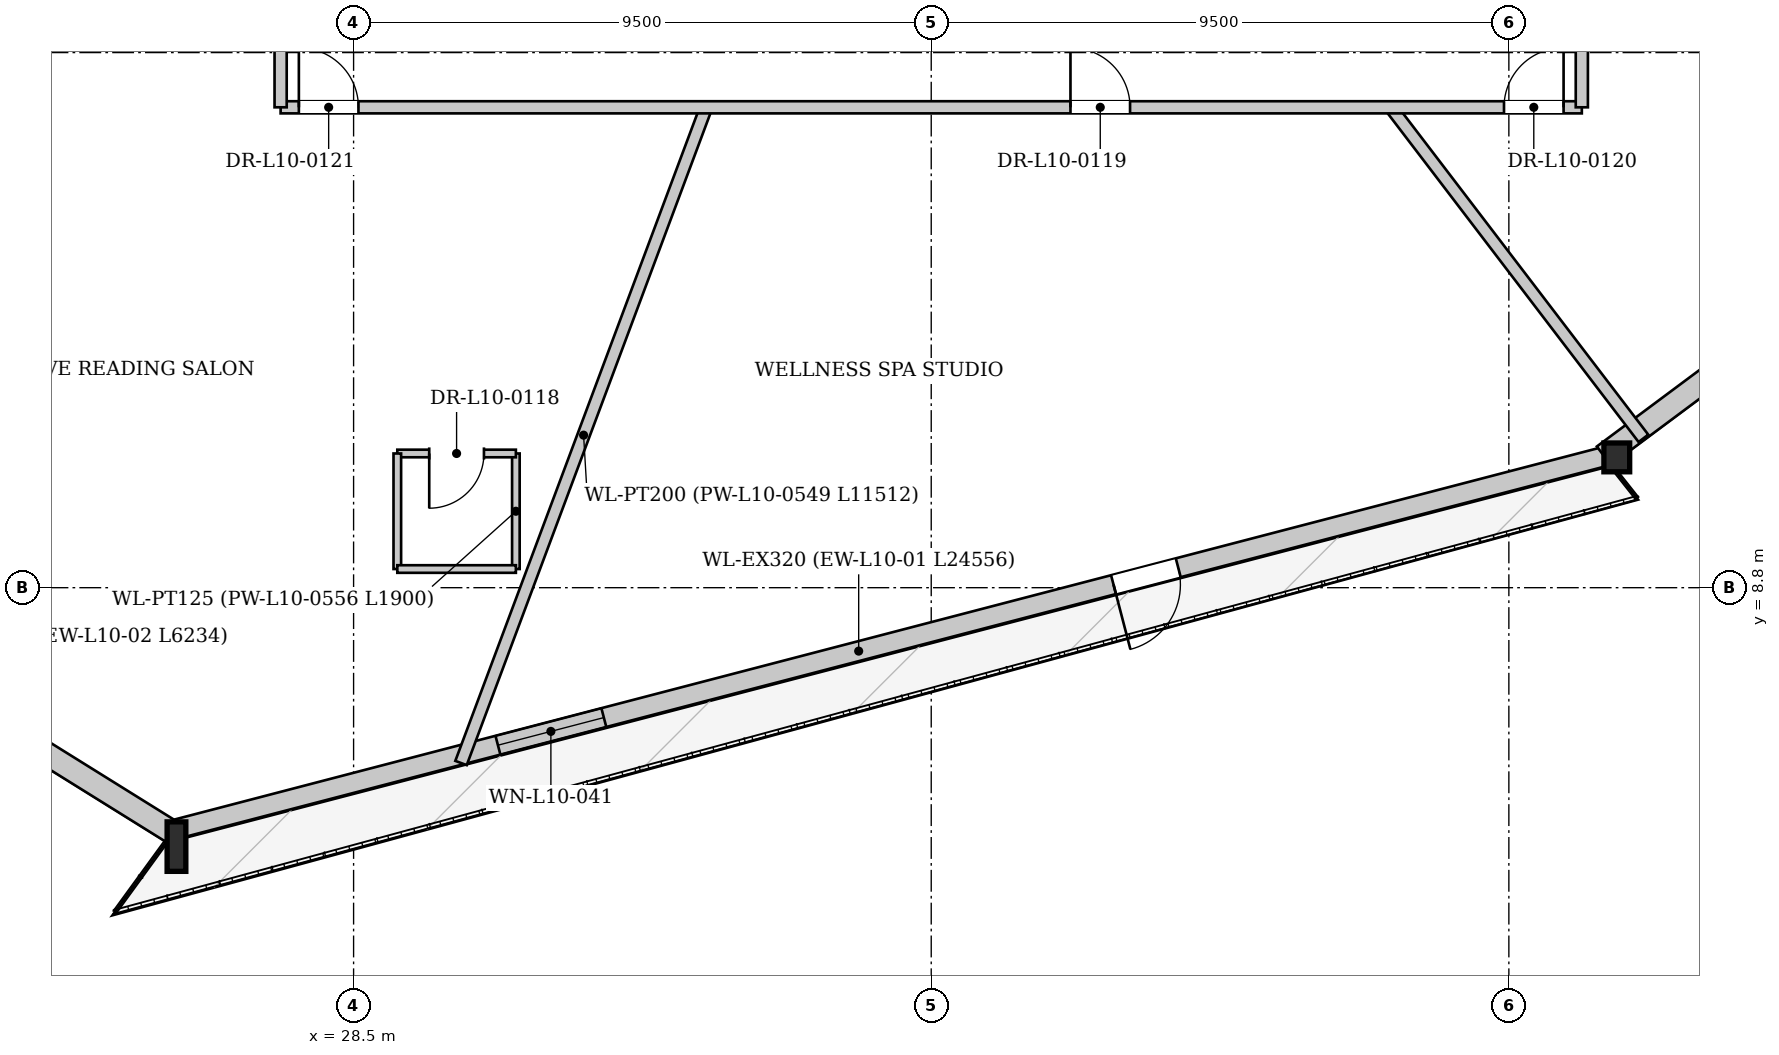
"""IFC4 building model, lengths in metres.
Left out: names, types, materials, properties, quantities, classifications, styles, units other than length and angle.
Written with IfcOpenShell. Run it as: python <this file> out.ifc"""

import sys

from ifc_helpers import new_model, si_unit, direction, frame, frame_2d, origin, origin_2d, place, context, subcontext, project, spatial, rectangle, i_section, extrude, source, transform, mapped, element, fill, save


model = new_model("IFC4")
c1 = context("Model", 3, precision=1e-05, world=origin(), true_north=direction((0.0, 1.0)))
c2 = subcontext(c1, "Body", "Model", "MODEL_VIEW")
j1 = project(units=[si_unit("LENGTHUNIT", "METRE"), si_unit("PLANEANGLEUNIT", "RADIAN")], contexts=[c1])
p1 = place(None, origin())
s1 = spatial("IfcSite", under=j1, at=p1, CompositionType="ELEMENT")
p2 = place(p1, origin())
s2 = spatial("IfcBuilding", under=s1, at=p2, CompositionType="ELEMENT")
p3 = place(p2, frame((0.0, 0.0, 43.5)))
s3 = spatial("IfcBuildingStorey", under=s2, at=p3, CompositionType="ELEMENT", Elevation=43.5)
m1 = source(origin(), c2, "Body", "SweptSolid", [
    extrude(i_section(OverallWidth=0.308, OverallDepth=0.814, WebThickness=0.021, FlangeThickness=0.04, at=origin_2d()), origin(), (0.0, 0.0, 1.0), 3.406),
])
p4 = place(p3, frame((25.414, 4.62, 0.0), z_axis=(0.101705377608, -0.045799673215, 0.993759732581), x_axis=(0.410605127545, 0.911813264454, 0.0)))
e1 = element("IfcColumn", 1, at=p4, inside=s3, PredefinedType="COLUMN", context=c2, shape_type="MappedRepresentation", body=[
    mapped(m1, transform((0.0, 0.0, 0.0), x_axis=(1.0, 0.0, 0.0), y_axis=(0.0, 1.0, 0.0), z_axis=(0.0, 0.0, 1.0), scale=1.0)),
])
m2 = source(origin(), c2, "Body", "SweptSolid", [
    extrude(i_section(OverallWidth=0.424, OverallDepth=0.474, WebThickness=0.043, FlangeThickness=0.068, at=origin_2d()), origin(), (0.0, 0.0, 1.0), 3.4),
])
p5 = place(p3, frame((49.174, 10.817, 0.0), z_axis=(0.059235895366, 0.07366791351, 0.995522047581), x_axis=(-0.779310211571, 0.626638328018, 0.0)))
e2 = element("IfcColumn", 2, at=p5, inside=s3, PredefinedType="COLUMN", context=c2, shape_type="MappedRepresentation", body=[
    mapped(m2, transform((0.0, 0.0, 0.0), x_axis=(1.0, 0.0, 0.0), y_axis=(0.0, 1.0, 0.0), z_axis=(0.0, 0.0, 1.0), scale=1.0)),
])
p6 = place(p3, frame((49.134, 10.972, 0.0), z_axis=(0.0, 0.0, 1.0), x_axis=(-0.967626668542, -0.252385875847, 0.0)))
e3 = element("IfcWall", 3, at=p6, inside=s3, PredefinedType="SOLIDWALL", context=c2, shape_type="SweptSolid", body=[
    extrude(rectangle(XDim=24.556, YDim=0.32, at=frame_2d((12.278, 0.0))), origin(), (0.0, 0.0, 1.0), 2.592),
])
p7 = place(p6, frame((7.308, 0.0, 0.0)))
e4 = element("IfcOpeningElement", 4, at=p7, cuts=e3, PredefinedType="OPENING", context=c2, shape_type="SweptSolid", body=[
    extrude(rectangle(XDim=1.1, YDim=2.3, at=frame_2d((0.55, 1.15))), frame((0.0, 0.17, 0.0), z_axis=(0.0, -1.0, 0.0), x_axis=(1.0, 0.0, 0.0)), (0.0, 0.0, 1.0), 0.34),
])
p8 = place(p6, frame((17.071, 0.0, 0.272)))
e5 = element("IfcOpeningElement", 5, at=p8, cuts=e3, PredefinedType="OPENING", context=c2, shape_type="SweptSolid", body=[
    extrude(rectangle(XDim=1.8, YDim=2.2, at=frame_2d((0.9, 1.1))), frame((0.0, 0.17, 0.0), z_axis=(0.0, -1.0, 0.0), x_axis=(1.0, 0.0, 0.0)), (0.0, 0.0, 1.0), 0.34),
])
p9 = place(p3, frame((25.514, 4.781, 0.0), z_axis=(0.0, 0.0, 1.0), x_axis=(-0.848982430353, 0.528421075424, 0.0)))
e6 = element("IfcWall", 6, at=p9, inside=s3, PredefinedType="SOLIDWALL", context=c2, shape_type="SweptSolid", body=[
    extrude(rectangle(XDim=6.234, YDim=0.38, at=frame_2d((3.117, 0.0))), origin(), (0.0, 0.0, 1.0), 2.592),
])
p10 = place(p3, frame((68.754, 25.638, 0.0), z_axis=(0.0, 0.0, 1.0), x_axis=(-0.801982102685, -0.59734806183, 0.0)))
e7 = element("IfcWall", 7, at=p10, inside=s3, PredefinedType="SOLIDWALL", context=c2, shape_type="SweptSolid", body=[
    extrude(rectangle(XDim=24.556, YDim=0.38, at=frame_2d((12.278, 0.0))), origin(), (0.0, 0.0, 1.0), 2.592),
])
p11 = place(p10, frame((6.276, 0.0, 0.65)))
e8 = element("IfcOpeningElement", 8, at=p11, cuts=e7, PredefinedType="OPENING", context=c2, shape_type="SweptSolid", body=[
    extrude(rectangle(XDim=1.2, YDim=1.5, at=frame_2d((0.6, 0.75))), frame((0.0, 0.2, 0.0), z_axis=(0.0, -1.0, 0.0), x_axis=(1.0, 0.0, 0.0)), (0.0, 0.0, 1.0), 0.4),
])
p12 = place(p10, frame((17.08, 0.0, 0.65)))
e9 = element("IfcOpeningElement", 9, at=p12, cuts=e7, PredefinedType="OPENING", context=c2, shape_type="SweptSolid", body=[
    extrude(rectangle(XDim=1.2, YDim=1.5, at=frame_2d((0.6, 0.75))), frame((0.0, 0.2, 0.0), z_axis=(0.0, -1.0, 0.0), x_axis=(1.0, 0.0, 0.0)), (0.0, 0.0, 1.0), 0.4),
])
p13 = place(p3, frame((34.299, 16.7, 0.0), z_axis=(0.0, 0.0, 1.0), x_axis=(-0.350212246301, -0.936670370269, 0.0)))
e10 = element("IfcWall", 10, at=p13, inside=s3, PredefinedType="PARTITIONING", context=c2, shape_type="SweptSolid", body=[
    extrude(rectangle(XDim=11.512, YDim=0.2, at=frame_2d((5.756, 0.0))), origin(), (0.0, 0.0, 1.0), 3.3),
])
p14 = place(p3, frame((45.557, 16.7, 0.0), z_axis=(0.0, 0.0, 1.0), x_axis=(0.606788320392, -0.794863468928, 0.0)))
e11 = element("IfcWall", 11, at=p14, inside=s3, PredefinedType="PARTITIONING", context=c2, shape_type="SweptSolid", body=[
    extrude(rectangle(XDim=6.849, YDim=0.2, at=frame_2d((3.424, 0.0))), origin(), (0.0, 0.0, 1.0), 2.785),
])
p15 = place(p3, frame((27.3, 20.189, 0.0), z_axis=(0.0, 0.0, 1.0), x_axis=(-0.857808451078, -0.51396951394, 0.0)))
e12 = element("IfcWall", 12, at=p15, inside=s3, PredefinedType="PARTITIONING", context=c2, shape_type="SweptSolid", body=[
    extrude(rectangle(XDim=10.509, YDim=0.2, at=frame_2d((5.254, 0.0))), origin(), (0.0, 0.0, 1.0), 3.3),
])
p16 = place(p3, frame((31.169, 9.107, 0.0), z_axis=(0.0, 0.0, 1.0), x_axis=(0.0, 1.0, 0.0)))
e13 = element("IfcWall", 13, at=p16, inside=s3, PredefinedType="PARTITIONING", context=c2, shape_type="SweptSolid", body=[
    extrude(rectangle(XDim=1.9, YDim=0.125, at=frame_2d((0.95, 0.0))), origin(), (0.0, 0.0, 1.0), 3.3),
])
p17 = place(p3, frame((31.169, 11.007, 0.0), z_axis=(0.0, 0.0, 1.0), x_axis=(-1.0, 0.0, 0.0)))
e14 = element("IfcWall", 14, at=p17, inside=s3, PredefinedType="PARTITIONING", context=c2, shape_type="SweptSolid", body=[
    extrude(rectangle(XDim=1.95, YDim=0.125, at=frame_2d((0.975, 0.0))), origin(), (0.0, 0.0, 1.0), 3.3),
])
p18 = place(p17, frame((0.525, 0.0, 0.0)))
e15 = element("IfcOpeningElement", 15, at=p18, cuts=e14, PredefinedType="OPENING", context=c2, shape_type="SweptSolid", body=[
    extrude(rectangle(XDim=0.9, YDim=2.1, at=frame_2d((0.45, 1.05))), frame((0.0, 0.073, 0.0), z_axis=(0.0, -1.0, 0.0), x_axis=(1.0, 0.0, 0.0)), (0.0, 0.0, 1.0), 0.145),
])
p19 = place(p3, frame((29.219, 11.007, 0.0), z_axis=(0.0, 0.0, 1.0), x_axis=(0.0, -1.0, 0.0)))
e16 = element("IfcWall", 16, at=p19, inside=s3, PredefinedType="PARTITIONING", context=c2, shape_type="SweptSolid", body=[
    extrude(rectangle(XDim=1.9, YDim=0.125, at=frame_2d((0.95, 0.0))), origin(), (0.0, 0.0, 1.0), 2.795),
])
p20 = place(p3, frame((29.219, 9.107, 0.0), z_axis=(0.0, 0.0, 1.0), x_axis=(1.0, 0.0, 0.0)))
e17 = element("IfcWall", 17, at=p20, inside=s3, PredefinedType="PARTITIONING", context=c2, shape_type="SweptSolid", body=[
    extrude(rectangle(XDim=1.95, YDim=0.125, at=frame_2d((0.975, 0.0))), origin(), (0.0, 0.0, 1.0), 3.3),
])
p21 = place(p3, frame((27.3, 16.7, 0.0), z_axis=(0.0, 0.0, 1.0), x_axis=(1.0, 0.0, 0.0)))
e18 = element("IfcWall", 18, at=p21, inside=s3, PredefinedType="PARTITIONING", context=c2, shape_type="SweptSolid", body=[
    extrude(rectangle(XDim=21.4, YDim=0.2, at=frame_2d((10.7, 0.0))), origin(), (0.0, 0.0, 1.0), 3.3),
])
p22 = place(p21, frame((12.99, 0.0, 0.0)))
e19 = element("IfcOpeningElement", 19, at=p22, cuts=e18, PredefinedType="OPENING", context=c2, shape_type="SweptSolid", body=[
    extrude(rectangle(XDim=0.98, YDim=2.15, at=frame_2d((0.49, 1.075))), frame((0.0, 0.11, 0.0), z_axis=(0.0, -1.0, 0.0), x_axis=(1.0, 0.0, 0.0)), (0.0, 0.0, 1.0), 0.22),
])
p23 = place(p21, frame((20.12, 0.0, 0.0)))
e20 = element("IfcOpeningElement", 20, at=p23, cuts=e18, PredefinedType="OPENING", context=c2, shape_type="SweptSolid", body=[
    extrude(rectangle(XDim=0.98, YDim=2.15, at=frame_2d((0.49, 1.075))), frame((0.0, 0.11, 0.0), z_axis=(0.0, -1.0, 0.0), x_axis=(1.0, 0.0, 0.0)), (0.0, 0.0, 1.0), 0.22),
])
p24 = place(p21, frame((0.3, 0.0, 0.0)))
e21 = element("IfcOpeningElement", 21, at=p24, cuts=e18, PredefinedType="OPENING", context=c2, shape_type="SweptSolid", body=[
    extrude(rectangle(XDim=0.98, YDim=2.15, at=frame_2d((0.49, 1.075))), frame((0.0, 0.11, 0.0), z_axis=(0.0, -1.0, 0.0), x_axis=(1.0, 0.0, 0.0)), (0.0, 0.0, 1.0), 0.22),
])
p25 = place(p3, frame((27.3, 16.7, 0.0), z_axis=(0.0, 0.0, 1.0), x_axis=(0.0, 1.0, 0.0)))
e22 = element("IfcWall", 22, at=p25, inside=s3, PredefinedType="PARTITIONING", context=c2, shape_type="SweptSolid", body=[
    extrude(rectangle(XDim=19.8, YDim=0.2, at=frame_2d((9.9, 0.0))), origin(), (0.0, 0.0, 1.0), 3.3),
])
p26 = place(p25, frame((18.52, 0.0, 0.0)))
e23 = element("IfcOpeningElement", 23, at=p26, cuts=e22, PredefinedType="OPENING", context=c2, shape_type="SweptSolid", body=[
    extrude(rectangle(XDim=0.98, YDim=2.15, at=frame_2d((0.49, 1.075))), frame((0.0, 0.11, 0.0), z_axis=(0.0, -1.0, 0.0), x_axis=(1.0, 0.0, 0.0)), (0.0, 0.0, 1.0), 0.22),
])
p27 = place(p25, frame((5.803, 0.0, 0.0)))
e24 = element("IfcOpeningElement", 24, at=p27, cuts=e22, PredefinedType="OPENING", context=c2, shape_type="SweptSolid", body=[
    extrude(rectangle(XDim=0.98, YDim=2.15, at=frame_2d((0.49, 1.075))), frame((0.0, 0.11, 0.0), z_axis=(0.0, -1.0, 0.0), x_axis=(1.0, 0.0, 0.0)), (0.0, 0.0, 1.0), 0.22),
])
p28 = place(p3, frame((48.7, 16.7, 0.0), z_axis=(0.0, 0.0, 1.0), x_axis=(0.0, 1.0, 0.0)))
e25 = element("IfcWall", 25, at=p28, inside=s3, PredefinedType="PARTITIONING", context=c2, shape_type="SweptSolid", body=[
    extrude(rectangle(XDim=19.8, YDim=0.2, at=frame_2d((9.9, 0.0))), origin(), (0.0, 0.0, 1.0), 3.3),
])
m3 = source(origin(), c2, "Body", "SweptSolid", [
    extrude(rectangle(XDim=1.1, YDim=2.3, at=frame_2d((0.55, 1.15))), frame((0.0, 0.025, 0.0), z_axis=(0.0, -1.0, 0.0), x_axis=(1.0, 0.0, 0.0)), (0.0, 0.0, 1.0), 0.05),
])
p29 = place(p7, origin())
e26 = element("IfcDoor", 26, at=p29, inside=s3, OperationType="SINGLE_SWING_RIGHT", PredefinedType="DOOR", context=c2, shape_type="MappedRepresentation", body=[
    mapped(m3, transform((0.0, 0.0, 0.0), x_axis=(1.0, 0.0, 0.0), y_axis=(0.0, 1.0, 0.0), z_axis=(0.0, 0.0, 1.0), scale=1.0)),
])
fill(e4, e26)
m4 = source(origin(), c2, "Body", "SweptSolid", [
    extrude(rectangle(XDim=1.8, YDim=2.2, at=frame_2d((0.9, 1.1))), frame((0.0, 0.03, 0.0), z_axis=(0.0, -1.0, 0.0), x_axis=(1.0, 0.0, 0.0)), (0.0, 0.0, 1.0), 0.06),
])
p30 = place(p8, origin())
e27 = element("IfcWindow", 27, at=p30, inside=s3, PartitioningType="SINGLE_PANEL", PredefinedType="WINDOW", context=c2, shape_type="MappedRepresentation", body=[
    mapped(m4, transform((0.0, 0.0, 0.0), x_axis=(1.0, 0.0, 0.0), y_axis=(0.0, 1.0, 0.0), z_axis=(0.0, 0.0, 1.0), scale=1.0)),
])
fill(e5, e27)
m5 = source(origin(), c2, "Body", "SweptSolid", [
    extrude(rectangle(XDim=0.9, YDim=2.1, at=frame_2d((0.45, 1.05))), frame((0.0, 0.025, 0.0), z_axis=(0.0, -1.0, 0.0), x_axis=(1.0, 0.0, 0.0)), (0.0, 0.0, 1.0), 0.05),
])
p31 = place(p18, origin())
e28 = element("IfcDoor", 28, at=p31, inside=s3, OperationType="SINGLE_SWING_RIGHT", PredefinedType="DOOR", context=c2, shape_type="MappedRepresentation", body=[
    mapped(m5, transform((0.0, 0.0, 0.0), x_axis=(1.0, 0.0, 0.0), y_axis=(0.0, 1.0, 0.0), z_axis=(0.0, 0.0, 1.0), scale=1.0)),
])
fill(e15, e28)
m6 = source(origin(), c2, "Body", "SweptSolid", [
    extrude(rectangle(XDim=0.98, YDim=2.15, at=frame_2d((0.49, 1.075))), frame((0.0, 0.025, 0.0), z_axis=(0.0, -1.0, 0.0), x_axis=(1.0, 0.0, 0.0)), (0.0, 0.0, 1.0), 0.05),
])
p32 = place(p22, origin())
e29 = element("IfcDoor", 29, at=p32, inside=s3, OperationType="SINGLE_SWING_LEFT", PredefinedType="DOOR", context=c2, shape_type="MappedRepresentation", body=[
    mapped(m6, transform((0.0, 0.0, 0.0), x_axis=(1.0, 0.0, 0.0), y_axis=(0.0, 1.0, 0.0), z_axis=(0.0, 0.0, 1.0), scale=1.0)),
])
fill(e19, e29)
p33 = place(p23, origin())
e30 = element("IfcDoor", 30, at=p33, inside=s3, OperationType="SINGLE_SWING_RIGHT", PredefinedType="DOOR", context=c2, shape_type="MappedRepresentation", body=[
    mapped(m6, transform((0.0, 0.0, 0.0), x_axis=(1.0, 0.0, 0.0), y_axis=(0.0, 1.0, 0.0), z_axis=(0.0, 0.0, 1.0), scale=1.0)),
])
fill(e20, e30)
p34 = place(p24, origin())
e31 = element("IfcDoor", 31, at=p34, inside=s3, OperationType="SINGLE_SWING_LEFT", PredefinedType="DOOR", context=c2, shape_type="MappedRepresentation", body=[
    mapped(m6, transform((0.0, 0.0, 0.0), x_axis=(1.0, 0.0, 0.0), y_axis=(0.0, 1.0, 0.0), z_axis=(0.0, 0.0, 1.0), scale=1.0)),
])
fill(e21, e31)
save(model, sys.argv[1])
